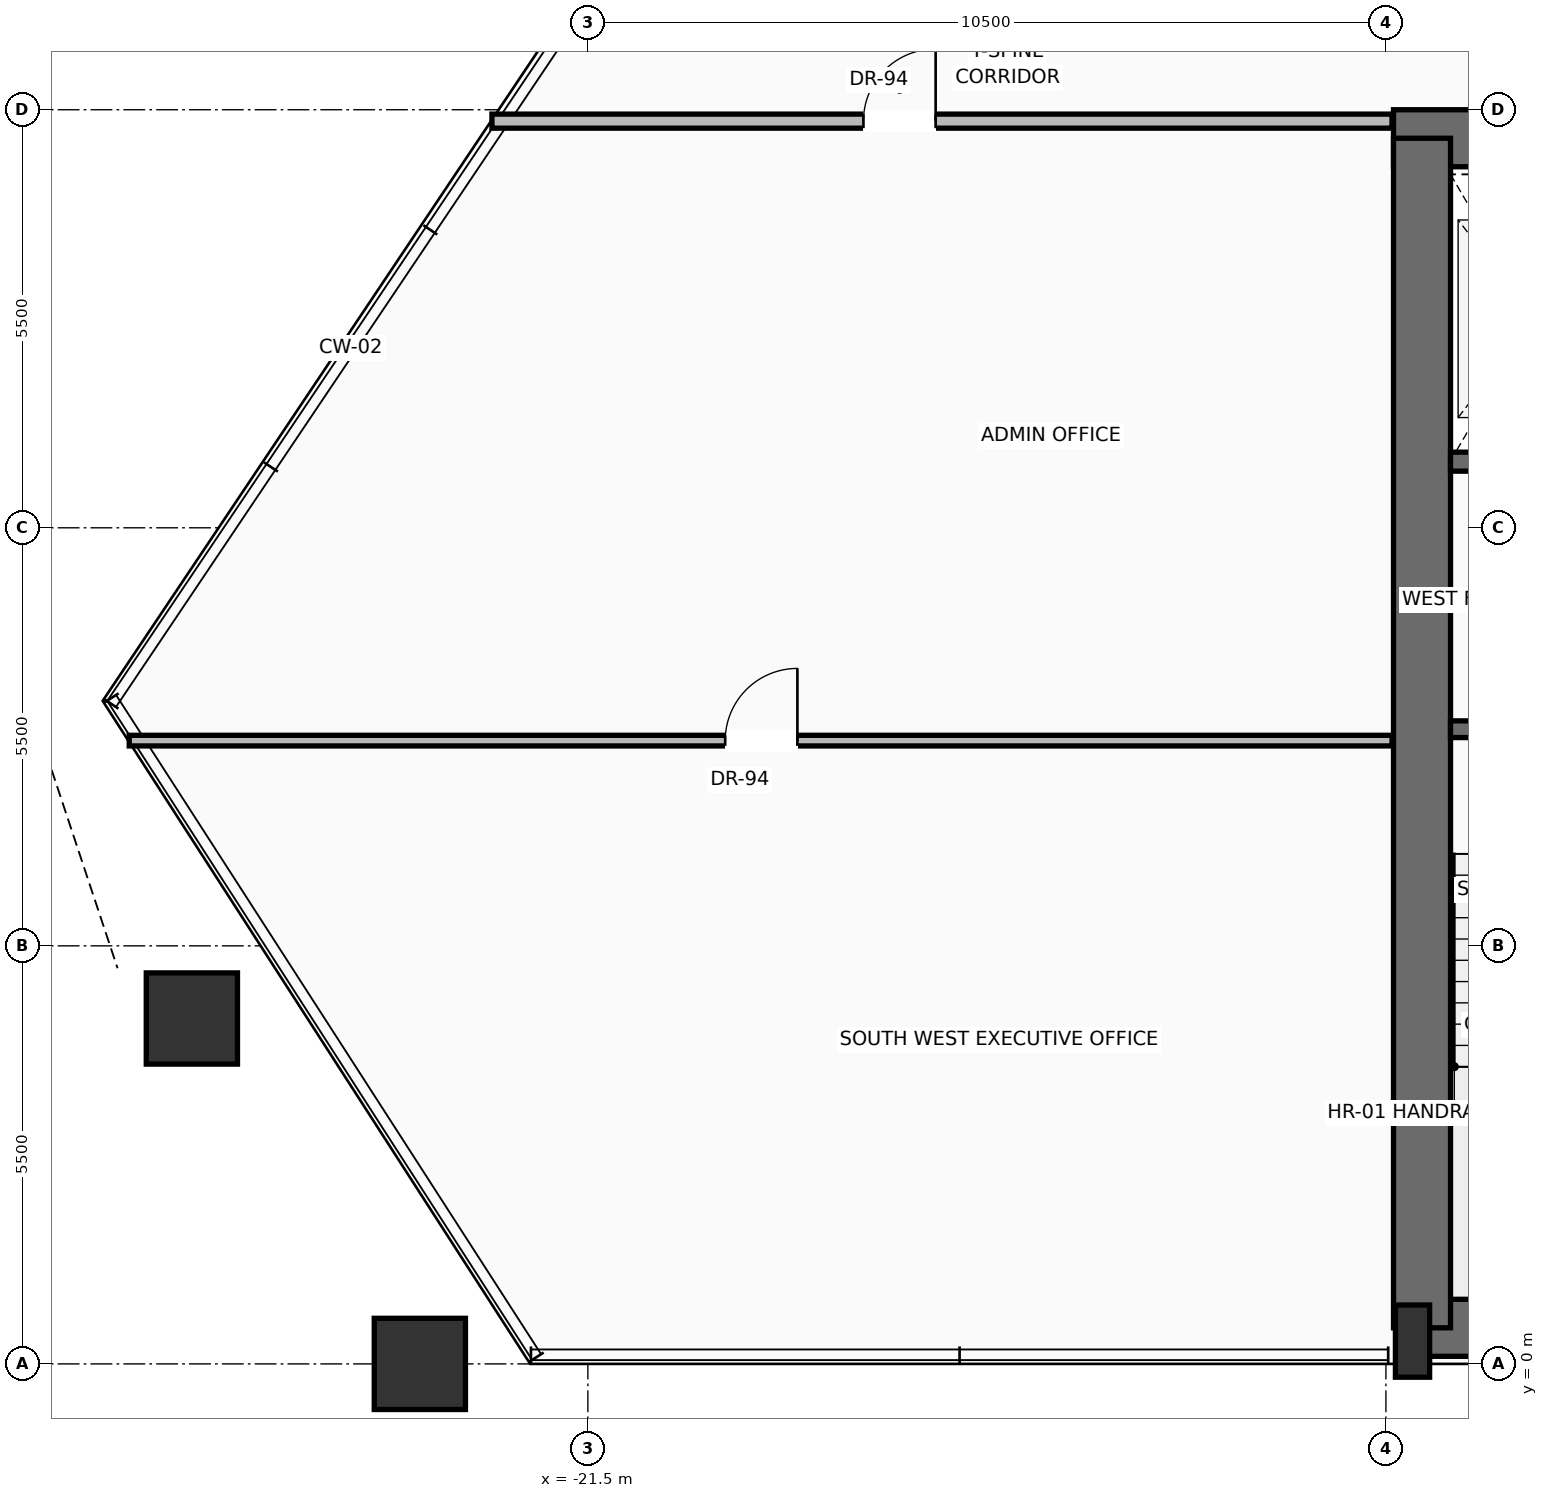
"""IFC4 building model, lengths in metres.
Left out: names, types, materials, properties, quantities, classifications, styles, units other than length and angle.
Written with IfcOpenShell. Run it as: python <this file> out.ifc"""

import sys

from ifc_helpers import new_model, si_unit, direction, frame, frame_2d, origin, origin_2d, place, context, subcontext, project, spatial, rectangle, hollow_rectangle, extrude, source, transform, mapped, element, fill, save


model = new_model("IFC4")
c1 = context("Model", 3, precision=1e-05, world=origin(), true_north=direction((0.0, 1.0)))
c2 = subcontext(c1, "Body", "Model", "MODEL_VIEW")
j1 = project(units=[si_unit("LENGTHUNIT", "METRE"), si_unit("PLANEANGLEUNIT", "RADIAN")], contexts=[c1])
p1 = place(None, origin())
s1 = spatial("IfcSite", under=j1, at=p1, CompositionType="ELEMENT")
p2 = place(p1, origin())
s2 = spatial("IfcBuilding", under=s1, at=p2, CompositionType="ELEMENT")
p3 = place(p2, frame((0.0, 0.0, 102.5)))
s3 = spatial("IfcBuildingStorey", under=s2, at=p3, CompositionType="ELEMENT", Elevation=102.5)
p4 = place(p3, frame((-10.65, 0.475, 0.0), z_axis=(0.0, 0.0, 1.0), x_axis=(1.0, 0.0, 0.0)))
e1 = element("IfcWall", 1, at=p4, inside=s3, PredefinedType="SHEAR", context=c2, shape_type="SweptSolid", body=[
    extrude(rectangle(XDim=21.3, YDim=0.75, at=frame_2d((10.65, 0.0))), origin(), (0.0, 0.0, 1.0), 3.45),
])
p5 = place(p3, frame((-10.9, 16.125, 0.0), z_axis=(0.0, 0.0, 1.0), x_axis=(1.0, 0.0, 0.0)))
e2 = element("IfcWall", 2, at=p5, inside=s3, PredefinedType="SHEAR", context=c2, shape_type="SweptSolid", body=[
    extrude(rectangle(XDim=21.8, YDim=0.75, at=frame_2d((10.9, 0.0))), origin(), (0.0, 0.0, 1.0), 3.45),
])
p6 = place(p5, frame((3.47, 0.0, 0.0)))
e3 = element("IfcOpeningElement", 3, at=p6, cuts=e2, PredefinedType="OPENING", context=c2, shape_type="SweptSolid", body=[
    extrude(rectangle(XDim=1.3, YDim=2.3, at=frame_2d((0.65, 1.15))), frame((0.0, 0.385, 0.0), z_axis=(0.0, -1.0, 0.0), x_axis=(1.0, 0.0, 0.0)), (0.0, 0.0, 1.0), 0.77),
])
p7 = place(p5, frame((9.9, 0.0, 0.0)))
e4 = element("IfcOpeningElement", 4, at=p7, cuts=e2, PredefinedType="OPENING", context=c2, shape_type="SweptSolid", body=[
    extrude(rectangle(XDim=2.0, YDim=2.4, at=frame_2d((1.0, 1.2))), frame((0.0, 0.385, 0.0), z_axis=(0.0, -1.0, 0.0), x_axis=(1.0, 0.0, 0.0)), (0.0, 0.0, 1.0), 0.77),
])
p8 = place(p3, frame((-10.525, 0.475, 0.0), z_axis=(0.0, 0.0, 1.0), x_axis=(0.0, 1.0, 0.0)))
e5 = element("IfcWall", 5, at=p8, inside=s3, PredefinedType="SHEAR", context=c2, shape_type="SweptSolid", body=[
    extrude(rectangle(XDim=15.65, YDim=0.75, at=frame_2d((7.825, 0.0))), origin(), (0.0, 0.0, 1.0), 3.45),
])
m1 = source(origin(), c2, "Body", "SweptSolid", [
    extrude(rectangle(XDim=0.45, YDim=0.95, at=origin_2d()), origin(), (0.0, 0.0, 1.0), 3.7),
])
p9 = place(p3, frame((-10.65, 0.3, 0.0), z_axis=(0.0, 0.0, 1.0), x_axis=(1.0, 0.0, 0.0)))
e6 = element("IfcColumn", 6, at=p9, inside=s3, PredefinedType="PILASTER", context=c2, shape_type="MappedRepresentation", body=[
    mapped(m1, transform((0.0, 0.0, 0.0), scale=1.0)),
])
m2 = source(origin(), c2, "Body", "SweptSolid", [
    extrude(hollow_rectangle(XDim=1.2, YDim=1.2, WallThickness=0.06, at=origin_2d()), origin(), (0.0, 0.0, 1.0), 3.691),
])
p10 = place(p3, frame((-23.711, 0.0, 0.004), z_axis=(-0.013822344968, 0.0, 0.999904466827), x_axis=(0.0, -1.0, 0.0)))
e7 = element("IfcColumn", 7, at=p10, inside=s3, PredefinedType="COLUMN", context=c2, shape_type="MappedRepresentation", body=[
    mapped(m2, transform((0.0, 0.0, 0.0), scale=1.0)),
])
m3 = source(origin(), c2, "Body", "SweptSolid", [
    extrude(hollow_rectangle(XDim=1.2, YDim=1.2, WallThickness=0.06, at=origin_2d()), origin(), (0.0, 0.0, 1.0), 3.692),
])
p11 = place(p3, frame((-26.71, 4.544, 0.004), z_axis=(-0.001454917462, -0.01673155081, 0.999858959265), x_axis=(0.996240588196, -0.086629616365, 0.0)))
e8 = element("IfcColumn", 8, at=p11, inside=s3, PredefinedType="COLUMN", context=c2, shape_type="MappedRepresentation", body=[
    mapped(m3, transform((0.0, 0.0, 0.0), scale=1.0)),
])
p12 = place(p3, frame((-5.5, 8.35, 0.0), z_axis=(0.0, 0.0, 1.0), x_axis=(-1.0, 0.0, 0.0)))
e9 = element("IfcWall", 9, at=p12, inside=s3, PredefinedType="SOLIDWALL", context=c2, shape_type="SweptSolid", body=[
    extrude(rectangle(XDim=4.65, YDim=0.22, at=frame_2d((2.325, 0.0))), origin(), (0.0, 0.0, 1.0), 3.45),
])
p13 = place(p12, frame((2.5, 0.0, 0.0)))
e10 = element("IfcOpeningElement", 10, at=p13, cuts=e9, PredefinedType="OPENING", context=c2, shape_type="SweptSolid", body=[
    extrude(rectangle(XDim=1.15, YDim=2.2, at=frame_2d((0.575, 1.1))), frame((0.0, 0.12, 0.0), z_axis=(0.0, -1.0, 0.0), x_axis=(1.0, 0.0, 0.0)), (0.0, 0.0, 1.0), 0.24),
])
p14 = place(p3, frame((-5.5, 11.87, 0.0), z_axis=(0.0, 0.0, 1.0), x_axis=(-1.0, 0.0, 0.0)))
e11 = element("IfcWall", 11, at=p14, inside=s3, PredefinedType="SOLIDWALL", context=c2, shape_type="SweptSolid", body=[
    extrude(rectangle(XDim=4.65, YDim=0.25, at=frame_2d((2.325, 0.0))), origin(), (0.0, 0.0, 1.0), 3.45),
])
p15 = place(p14, frame((2.95, 0.0, 0.0)))
e12 = element("IfcOpeningElement", 12, at=p15, cuts=e11, PredefinedType="OPENING", context=c2, shape_type="SweptSolid", body=[
    extrude(rectangle(XDim=1.2, YDim=2.25, at=frame_2d((0.6, 1.125))), frame((0.0, 0.135, 0.0), z_axis=(0.0, -1.0, 0.0), x_axis=(1.0, 0.0, 0.0)), (0.0, 0.0, 1.0), 0.27),
])
p16 = place(p3, frame((-22.762, 16.35, 0.0), z_axis=(0.0, 0.0, 1.0), x_axis=(1.0, 0.0, 0.0)))
e13 = element("IfcWall", 13, at=p16, inside=s3, PredefinedType="PARTITIONING", context=c2, shape_type="SweptSolid", body=[
    extrude(rectangle(XDim=11.842, YDim=0.185, at=frame_2d((5.921, 0.0))), origin(), (0.0, 0.0, 1.0), 2.747),
])
p17 = place(p16, frame((4.888, 0.0, 0.0)))
e14 = element("IfcOpeningElement", 14, at=p17, cuts=e13, PredefinedType="OPENING", context=c2, shape_type="SweptSolid", body=[
    extrude(rectangle(XDim=0.95, YDim=2.2, at=frame_2d((0.475, 1.1))), frame((0.0, 0.103, 0.0), z_axis=(0.0, -1.0, 0.0), x_axis=(1.0, 0.0, 0.0)), (0.0, 0.0, 1.0), 0.205),
])
p18 = place(p3, frame((-27.534, 8.2, 0.0), z_axis=(0.0, 0.0, 1.0), x_axis=(1.0, 0.0, 0.0)))
e15 = element("IfcWall", 15, at=p18, inside=s3, PredefinedType="PARTITIONING", context=c2, shape_type="SweptSolid", body=[
    extrude(rectangle(XDim=16.615, YDim=0.14, at=frame_2d((8.307, 0.0))), origin(), (0.0, 0.0, 1.0), 3.442),
])
p19 = place(p18, frame((7.841, 0.0, 0.0)))
e16 = element("IfcOpeningElement", 16, at=p19, cuts=e15, PredefinedType="OPENING", context=c2, shape_type="SweptSolid", body=[
    extrude(rectangle(XDim=0.95, YDim=2.2, at=frame_2d((0.475, 1.1))), frame((0.0, 0.08, 0.0), z_axis=(0.0, -1.0, 0.0), x_axis=(1.0, 0.0, 0.0)), (0.0, 0.0, 1.0), 0.16),
])
m4 = source(origin(), c2, "Body", "SweptSolid", [
    extrude(rectangle(XDim=0.95, YDim=2.2, at=frame_2d((0.475, 1.1))), frame((0.0, 0.025, 0.0), z_axis=(0.0, -1.0, 0.0), x_axis=(1.0, 0.0, 0.0)), (0.0, 0.0, 1.0), 0.05),
])
p20 = place(p17, origin())
e17 = element("IfcDoor", 17, at=p20, inside=s3, OperationType="SINGLE_SWING_RIGHT", PredefinedType="DOOR", context=c2, shape_type="MappedRepresentation", body=[
    mapped(m4, transform((0.0, 0.0, 0.0), scale=1.0)),
])
fill(e14, e17)
p21 = place(p19, origin())
e18 = element("IfcDoor", 18, at=p21, inside=s3, OperationType="SINGLE_SWING_RIGHT", PredefinedType="DOOR", context=c2, shape_type="MappedRepresentation", body=[
    mapped(m4, transform((0.0, 0.0, 0.0), scale=1.0)),
])
fill(e16, e18)
save(model, sys.argv[1])
